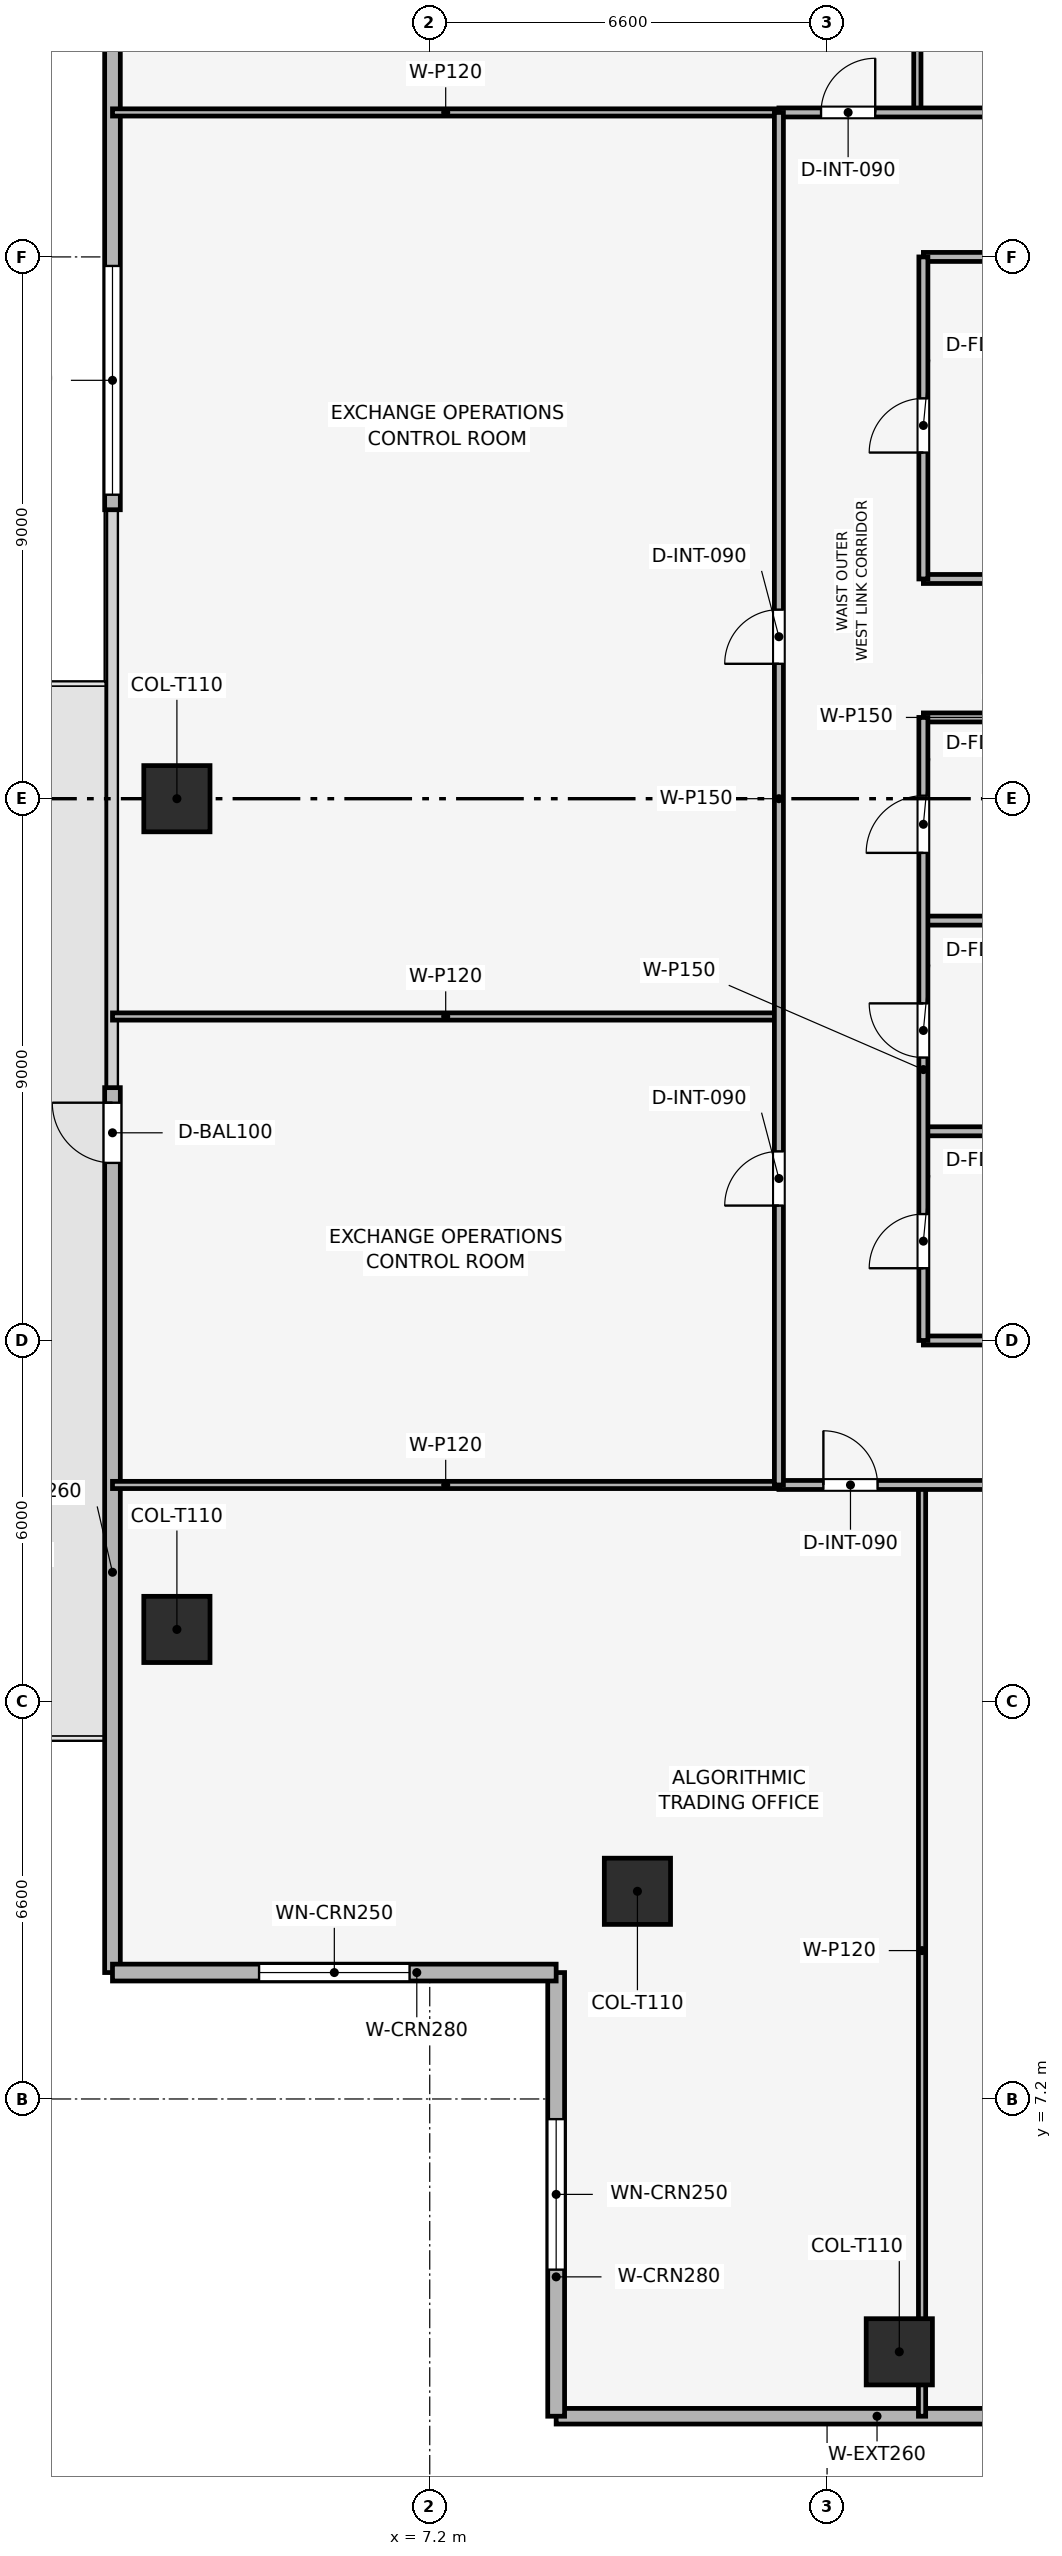
"""IFC4 building model, lengths in metres.
Left out: names, types, materials, properties, quantities, classifications, styles, units other than length and angle.
Written with IfcOpenShell. Run it as: python <this file> out.ifc"""

import sys

from ifc_helpers import new_model, si_unit, direction, frame, frame_2d, origin, origin_2d, place, context, subcontext, project, spatial, rectangle, extrude, element, fill, save


model = new_model("IFC4")
c1 = context("Model", 3, precision=1e-05, world=origin(), true_north=direction((0.0, 1.0)))
c2 = subcontext(c1, "Body", "Model", "MODEL_VIEW")
j1 = project(units=[si_unit("LENGTHUNIT", "METRE"), si_unit("PLANEANGLEUNIT", "RADIAN")], contexts=[c1])
p1 = place(None, origin())
s1 = spatial("IfcSite", under=j1, at=p1, CompositionType="ELEMENT")
p2 = place(p1, origin())
s2 = spatial("IfcBuilding", under=s1, at=p2, CompositionType="ELEMENT")
p3 = place(p2, frame((0.0, 0.0, 203.7)))
s3 = spatial("IfcBuildingStorey", under=s2, at=p3, CompositionType="ELEMENT", Elevation=203.7)
for number, where, z_axis, x_axis in (
    (1, (15.0, 3.0, 0.003), (0.0, 0.0, 1.0), (1.0, 0.0, 0.0)),
    (2, (3.0, 28.8, 0.003), (0.0, 0.0, 1.0), (1.0, 0.0, 0.0)),
    (3, (3.0, 15.0, 0.003), (0.0, 0.0, 1.0), (1.0, 0.0, 0.0)),
    (4, (10.65, 10.65, 0.003), (0.0, 0.0, 1.0), (1.0, 0.0, 0.0)),
):
    element("IfcColumn", number, at=place(p3, frame(where, z_axis=z_axis, x_axis=x_axis)), inside=s3, PredefinedType="COLUMN", context=c2, shape_type="SweptSolid", body=[
        extrude(rectangle(XDim=1.1, YDim=1.1, at=origin_2d()), origin(), (0.0, 0.0, 1.0), 3.494),
    ])
p4 = place(p3, frame((24.0, 1.93, 0.0), z_axis=(0.0, 0.0, 1.0), x_axis=(-1.0, 0.0, 0.0)))
e5 = element("IfcWall", 5, at=p4, inside=s3, PredefinedType="SOLIDWALL", context=c2, shape_type="SweptSolid", body=[
    extrude(rectangle(XDim=14.7, YDim=0.26, at=frame_2d((7.35, 0.0))), origin(), (0.0, 0.0, 1.0), 3.5),
])
p5 = place(p4, frame((2.33, 0.0, 0.9)))
e6 = element("IfcOpeningElement", 6, at=p5, cuts=e5, PredefinedType="OPENING", context=c2, shape_type="SweptSolid", body=[
    extrude(rectangle(XDim=3.8, YDim=1.9, at=frame_2d((1.9, 0.95))), frame((0.0, 0.14, 0.0), z_axis=(0.0, -1.0, 0.0), x_axis=(1.0, 0.0, 0.0)), (0.0, 0.0, 1.0), 0.28),
])
p6 = place(p3, frame((1.93, 9.3, 0.0), z_axis=(0.0, 0.0, 1.0), x_axis=(0.0, 1.0, 0.0)))
e7 = element("IfcWall", 7, at=p6, inside=s3, PredefinedType="SOLIDWALL", context=c2, shape_type="SweptSolid", body=[
    extrude(rectangle(XDim=14.7, YDim=0.26, at=frame_2d((7.35, 0.0))), origin(), (0.0, 0.0, 1.0), 3.5),
])
p7 = place(p6, frame((13.45, 0.0, 0.0)))
e8 = element("IfcOpeningElement", 8, at=p7, cuts=e7, PredefinedType="OPENING", context=c2, shape_type="SweptSolid", body=[
    extrude(rectangle(XDim=1.0, YDim=2.2, at=frame_2d((0.5, 1.1))), frame((0.0, 0.14, 0.0), z_axis=(0.0, -1.0, 0.0), x_axis=(1.0, 0.0, 0.0)), (0.0, 0.0, 1.0), 0.28),
])
p8 = place(p3, frame((1.93, 33.6, 0.0), z_axis=(0.0, 0.0, 1.0), x_axis=(0.0, 1.0, 0.0)))
e9 = element("IfcWall", 9, at=p8, inside=s3, PredefinedType="SOLIDWALL", context=c2, shape_type="SweptSolid", body=[
    extrude(rectangle(XDim=14.7, YDim=0.26, at=frame_2d((7.35, 0.0))), origin(), (0.0, 0.0, 1.0), 3.5),
])
p9 = place(p8, frame((0.25, 0.0, 0.9)))
e10 = element("IfcOpeningElement", 10, at=p9, cuts=e9, PredefinedType="OPENING", context=c2, shape_type="SweptSolid", body=[
    extrude(rectangle(XDim=3.8, YDim=1.9, at=frame_2d((1.9, 0.95))), frame((0.0, 0.14, 0.0), z_axis=(0.0, -1.0, 0.0), x_axis=(1.0, 0.0, 0.0)), (0.0, 0.0, 1.0), 0.28),
])
p10 = place(p3, frame((9.3, 1.93, 0.0), z_axis=(0.0, 0.0, 1.0), x_axis=(0.0, 1.0, 0.0)))
e11 = element("IfcWall", 11, at=p10, inside=s3, PredefinedType="SOLIDWALL", context=c2, shape_type="SweptSolid", body=[
    extrude(rectangle(XDim=7.37, YDim=0.28, at=frame_2d((3.685, 0.0))), origin(), (0.0, 0.0, 1.0), 3.5),
])
p11 = place(p10, frame((2.435, 0.0, 0.9)))
e12 = element("IfcOpeningElement", 12, at=p11, cuts=e11, PredefinedType="OPENING", context=c2, shape_type="SweptSolid", body=[
    extrude(rectangle(XDim=2.5, YDim=1.9, at=frame_2d((1.25, 0.95))), frame((0.0, 0.15, 0.0), z_axis=(0.0, -1.0, 0.0), x_axis=(1.0, 0.0, 0.0)), (0.0, 0.0, 1.0), 0.3),
])
p12 = place(p3, frame((9.3, 9.3, 0.0), z_axis=(0.0, 0.0, 1.0), x_axis=(-1.0, 0.0, 0.0)))
e13 = element("IfcWall", 13, at=p12, inside=s3, PredefinedType="SOLIDWALL", context=c2, shape_type="SweptSolid", body=[
    extrude(rectangle(XDim=7.37, YDim=0.28, at=frame_2d((3.685, 0.0))), origin(), (0.0, 0.0, 1.0), 3.5),
])
p13 = place(p12, frame((2.435, 0.0, 0.9)))
e14 = element("IfcOpeningElement", 14, at=p13, cuts=e13, PredefinedType="OPENING", context=c2, shape_type="SweptSolid", body=[
    extrude(rectangle(XDim=2.5, YDim=1.9, at=frame_2d((1.25, 0.95))), frame((0.0, 0.15, 0.0), z_axis=(0.0, -1.0, 0.0), x_axis=(1.0, 0.0, 0.0)), (0.0, 0.0, 1.0), 0.3),
])
p14 = place(p3, frame((15.4, 19.8, 0.0), z_axis=(0.0, 0.0, 1.0), x_axis=(1.0, 0.0, 0.0)))
e15 = element("IfcWall", 15, at=p14, inside=s3, PredefinedType="PARTITIONING", context=c2, shape_type="SweptSolid", body=[
    extrude(rectangle(XDim=4.4, YDim=0.15, at=frame_2d((2.2, 0.0))), origin(), (0.0, 0.0, 1.0), 3.035),
])
for number, where, z_axis, x_axis in (
    (16, (15.4, 23.275, 0.0), (0.0, 0.0, 1.0), (1.0, 0.0, 0.0)),
    (17, (15.4, 26.775, 0.0), (0.0, 0.0, 1.0), (1.0, 0.0, 0.0)),
    (18, (15.4, 30.15, 0.0), (0.0, 0.0, 1.0), (1.0, 0.0, 0.0)),
    (19, (15.4, 32.45, 0.0), (0.0, 0.0, 1.0), (1.0, 0.0, 0.0)),
):
    element("IfcWall", number, at=place(p3, frame(where, z_axis=z_axis, x_axis=x_axis)), inside=s3, PredefinedType="PARTITIONING", context=c2, shape_type="SweptSolid", body=[
        extrude(rectangle(XDim=4.4, YDim=0.15, at=frame_2d((2.2, 0.0))), origin(), (0.0, 0.0, 1.0), 3.5),
    ])
p15 = place(p3, frame((15.4, 37.8, 0.0), z_axis=(0.0, 0.0, 1.0), x_axis=(1.0, 0.0, 0.0)))
e20 = element("IfcWall", 20, at=p15, inside=s3, PredefinedType="PARTITIONING", context=c2, shape_type="SweptSolid", body=[
    extrude(rectangle(XDim=4.4, YDim=0.15, at=frame_2d((2.2, 0.0))), origin(), (0.0, 0.0, 1.0), 3.035),
])
p16 = place(p3, frame((15.4, 19.8, 0.0), z_axis=(0.0, 0.0, 1.0), x_axis=(0.0, 1.0, 0.0)))
e21 = element("IfcWall", 21, at=p16, inside=s3, PredefinedType="PARTITIONING", context=c2, shape_type="SweptSolid", body=[
    extrude(rectangle(XDim=10.35, YDim=0.15, at=frame_2d((5.175, 0.0))), origin(), (0.0, 0.0, 1.0), 3.035),
])
p17 = place(p16, frame((1.2, 0.0, 0.0)))
e22 = element("IfcOpeningElement", 22, at=p17, cuts=e21, PredefinedType="OPENING", context=c2, shape_type="SweptSolid", body=[
    extrude(rectangle(XDim=0.9, YDim=2.1, at=frame_2d((0.45, 1.05))), frame((0.0, 0.085, 0.0), z_axis=(0.0, -1.0, 0.0), x_axis=(1.0, 0.0, 0.0)), (0.0, 0.0, 1.0), 0.17),
])
p18 = place(p16, frame((4.7, 0.0, 0.0)))
e23 = element("IfcOpeningElement", 23, at=p18, cuts=e21, PredefinedType="OPENING", context=c2, shape_type="SweptSolid", body=[
    extrude(rectangle(XDim=0.9, YDim=2.1, at=frame_2d((0.45, 1.05))), frame((0.0, 0.085, 0.0), z_axis=(0.0, -1.0, 0.0), x_axis=(1.0, 0.0, 0.0)), (0.0, 0.0, 1.0), 0.17),
])
p19 = place(p16, frame((8.1, 0.0, 0.0)))
e24 = element("IfcOpeningElement", 24, at=p19, cuts=e21, PredefinedType="OPENING", context=c2, shape_type="SweptSolid", body=[
    extrude(rectangle(XDim=0.95, YDim=2.1, at=frame_2d((0.475, 1.05))), frame((0.0, 0.085, 0.0), z_axis=(0.0, -1.0, 0.0), x_axis=(1.0, 0.0, 0.0)), (0.0, 0.0, 1.0), 0.17),
])
p20 = place(p3, frame((15.4, 32.45, 0.0), z_axis=(0.0, 0.0, 1.0), x_axis=(0.0, 1.0, 0.0)))
e25 = element("IfcWall", 25, at=p20, inside=s3, PredefinedType="PARTITIONING", context=c2, shape_type="SweptSolid", body=[
    extrude(rectangle(XDim=5.35, YDim=0.15, at=frame_2d((2.675, 0.0))), origin(), (0.0, 0.0, 1.0), 3.035),
])
p21 = place(p20, frame((2.1, 0.0, 0.0)))
e26 = element("IfcOpeningElement", 26, at=p21, cuts=e25, PredefinedType="OPENING", context=c2, shape_type="SweptSolid", body=[
    extrude(rectangle(XDim=0.9, YDim=2.1, at=frame_2d((0.45, 1.05))), frame((0.0, 0.085, 0.0), z_axis=(0.0, -1.0, 0.0), x_axis=(1.0, 0.0, 0.0)), (0.0, 0.0, 1.0), 0.17),
])
for number, where, z_axis, x_axis in (
    (27, (15.378, 1.93, 0.0), (0.0, 0.0, 1.0), (0.0, 1.0, 0.0)),
    (28, (15.3, 40.2, 0.0), (0.0, 0.0, 1.0), (0.0, 1.0, 0.0)),
):
    element("IfcWall", number, at=place(p3, frame(where, z_axis=z_axis, x_axis=x_axis)), inside=s3, PredefinedType="PARTITIONING", context=c2, shape_type="SweptSolid", body=[
        extrude(rectangle(XDim=15.47, YDim=0.12, at=frame_2d((7.735, 0.0))), origin(), (0.0, 0.0, 1.0), 2.885),
    ])
for number, where, z_axis, x_axis in (
    (29, (1.93, 25.182, 0.0), (0.0, 0.0, 1.0), (1.0, 0.0, 0.0)),
    (30, (1.93, 17.4, 0.0), (0.0, 0.0, 1.0), (1.0, 0.0, 0.0)),
    (31, (1.93, 40.2, 0.0), (0.0, 0.0, 1.0), (1.0, 0.0, 0.0)),
):
    element("IfcWall", number, at=place(p3, frame(where, z_axis=z_axis, x_axis=x_axis)), inside=s3, PredefinedType="PARTITIONING", context=c2, shape_type="SweptSolid", body=[
        extrude(rectangle(XDim=11.07, YDim=0.12, at=frame_2d((5.535, 0.0))), origin(), (0.0, 0.0, 1.0), 2.885),
    ])
p22 = place(p3, frame((13.0, 17.4, 0.0), z_axis=(0.0, 0.0, 1.0), x_axis=(1.0, 0.0, 0.0)))
e32 = element("IfcWall", 32, at=p22, inside=s3, PredefinedType="PARTITIONING", context=c2, shape_type="SweptSolid", body=[
    extrude(rectangle(XDim=31.6, YDim=0.15, at=frame_2d((15.8, 0.0))), origin(), (0.0, 0.0, 1.0), 3.035),
])
p23 = place(p22, frame((0.739, 0.0, 0.0)))
e33 = element("IfcOpeningElement", 33, at=p23, cuts=e32, PredefinedType="OPENING", context=c2, shape_type="SweptSolid", body=[
    extrude(rectangle(XDim=0.9, YDim=2.1, at=frame_2d((0.45, 1.05))), frame((0.0, 0.085, 0.0), z_axis=(0.0, -1.0, 0.0), x_axis=(1.0, 0.0, 0.0)), (0.0, 0.0, 1.0), 0.17),
])
p24 = place(p22, frame((6.344, 0.0, 0.0)))
e34 = element("IfcOpeningElement", 34, at=p24, cuts=e32, PredefinedType="OPENING", context=c2, shape_type="SweptSolid", body=[
    extrude(rectangle(XDim=0.9, YDim=2.1, at=frame_2d((0.45, 1.05))), frame((0.0, 0.085, 0.0), z_axis=(0.0, -1.0, 0.0), x_axis=(1.0, 0.0, 0.0)), (0.0, 0.0, 1.0), 0.17),
])
p25 = place(p22, frame((15.174, 0.0, 0.0)))
e35 = element("IfcOpeningElement", 35, at=p25, cuts=e32, PredefinedType="OPENING", context=c2, shape_type="SweptSolid", body=[
    extrude(rectangle(XDim=0.9, YDim=2.1, at=frame_2d((0.45, 1.05))), frame((0.0, 0.085, 0.0), z_axis=(0.0, -1.0, 0.0), x_axis=(1.0, 0.0, 0.0)), (0.0, 0.0, 1.0), 0.17),
])
p26 = place(p22, frame((25.37, 0.0, 0.0)))
e36 = element("IfcOpeningElement", 36, at=p26, cuts=e32, PredefinedType="OPENING", context=c2, shape_type="SweptSolid", body=[
    extrude(rectangle(XDim=0.9, YDim=2.1, at=frame_2d((0.45, 1.05))), frame((0.0, 0.085, 0.0), z_axis=(0.0, -1.0, 0.0), x_axis=(1.0, 0.0, 0.0)), (0.0, 0.0, 1.0), 0.17),
])
p27 = place(p3, frame((13.0, 40.2, 0.0), z_axis=(0.0, 0.0, 1.0), x_axis=(1.0, 0.0, 0.0)))
e37 = element("IfcWall", 37, at=p27, inside=s3, PredefinedType="PARTITIONING", context=c2, shape_type="SweptSolid", body=[
    extrude(rectangle(XDim=31.6, YDim=0.15, at=frame_2d((15.8, 0.0))), origin(), (0.0, 0.0, 1.0), 3.035),
])
p28 = place(p27, frame((0.7, 0.0, 0.0)))
e38 = element("IfcOpeningElement", 38, at=p28, cuts=e37, PredefinedType="OPENING", context=c2, shape_type="SweptSolid", body=[
    extrude(rectangle(XDim=0.9, YDim=2.1, at=frame_2d((0.45, 1.05))), frame((0.0, 0.085, 0.0), z_axis=(0.0, -1.0, 0.0), x_axis=(1.0, 0.0, 0.0)), (0.0, 0.0, 1.0), 0.17),
])
p29 = place(p27, frame((6.454, 0.0, 0.0)))
e39 = element("IfcOpeningElement", 39, at=p29, cuts=e37, PredefinedType="OPENING", context=c2, shape_type="SweptSolid", body=[
    extrude(rectangle(XDim=0.9, YDim=2.1, at=frame_2d((0.45, 1.05))), frame((0.0, 0.085, 0.0), z_axis=(0.0, -1.0, 0.0), x_axis=(1.0, 0.0, 0.0)), (0.0, 0.0, 1.0), 0.17),
])
p30 = place(p27, frame((15.473, 0.0, 0.0)))
e40 = element("IfcOpeningElement", 40, at=p30, cuts=e37, PredefinedType="OPENING", context=c2, shape_type="SweptSolid", body=[
    extrude(rectangle(XDim=0.9, YDim=2.1, at=frame_2d((0.45, 1.05))), frame((0.0, 0.085, 0.0), z_axis=(0.0, -1.0, 0.0), x_axis=(1.0, 0.0, 0.0)), (0.0, 0.0, 1.0), 0.17),
])
p31 = place(p27, frame((25.519, 0.0, 0.0)))
e41 = element("IfcOpeningElement", 41, at=p31, cuts=e37, PredefinedType="OPENING", context=c2, shape_type="SweptSolid", body=[
    extrude(rectangle(XDim=0.9, YDim=2.1, at=frame_2d((0.45, 1.05))), frame((0.0, 0.085, 0.0), z_axis=(0.0, -1.0, 0.0), x_axis=(1.0, 0.0, 0.0)), (0.0, 0.0, 1.0), 0.17),
])
p32 = place(p3, frame((13.0, 17.4, 0.0), z_axis=(0.0, 0.0, 1.0), x_axis=(0.0, 1.0, 0.0)))
e42 = element("IfcWall", 42, at=p32, inside=s3, PredefinedType="PARTITIONING", context=c2, shape_type="SweptSolid", body=[
    extrude(rectangle(XDim=22.8, YDim=0.15, at=frame_2d((11.4, 0.0))), origin(), (0.0, 0.0, 1.0), 3.035),
])
p33 = place(p32, frame((4.641, 0.0, 0.0)))
e43 = element("IfcOpeningElement", 43, at=p33, cuts=e42, PredefinedType="OPENING", context=c2, shape_type="SweptSolid", body=[
    extrude(rectangle(XDim=0.9, YDim=2.1, at=frame_2d((0.45, 1.05))), frame((0.0, 0.085, 0.0), z_axis=(0.0, -1.0, 0.0), x_axis=(1.0, 0.0, 0.0)), (0.0, 0.0, 1.0), 0.17),
])
p34 = place(p32, frame((13.641, 0.0, 0.0)))
e44 = element("IfcOpeningElement", 44, at=p34, cuts=e42, PredefinedType="OPENING", context=c2, shape_type="SweptSolid", body=[
    extrude(rectangle(XDim=0.9, YDim=2.1, at=frame_2d((0.45, 1.05))), frame((0.0, 0.085, 0.0), z_axis=(0.0, -1.0, 0.0), x_axis=(1.0, 0.0, 0.0)), (0.0, 0.0, 1.0), 0.17),
])
p35 = place(p7, origin())
e45 = element("IfcDoor", 45, at=p35, inside=s3, OperationType="SINGLE_SWING_RIGHT", PredefinedType="DOOR", context=c2, shape_type="SweptSolid", body=[
    extrude(rectangle(XDim=1.0, YDim=2.2, at=frame_2d((0.5, 1.1))), frame((0.0, 0.025, 0.0), z_axis=(0.0, -1.0, 0.0), x_axis=(1.0, 0.0, 0.0)), (0.0, 0.0, 1.0), 0.05),
])
fill(e8, e45)
p36 = place(p9, origin())
e46 = element("IfcWindow", 46, at=p36, inside=s3, PartitioningType="SINGLE_PANEL", PredefinedType="WINDOW", context=c2, shape_type="SweptSolid", body=[
    extrude(rectangle(XDim=3.8, YDim=1.9, at=frame_2d((1.9, 0.95))), frame((0.0, 0.03, 0.0), z_axis=(0.0, -1.0, 0.0), x_axis=(1.0, 0.0, 0.0)), (0.0, 0.0, 1.0), 0.06),
])
fill(e10, e46)
p37 = place(p11, origin())
e47 = element("IfcWindow", 47, at=p37, inside=s3, PartitioningType="SINGLE_PANEL", PredefinedType="WINDOW", context=c2, shape_type="SweptSolid", body=[
    extrude(rectangle(XDim=2.5, YDim=1.9, at=frame_2d((1.25, 0.95))), frame((0.0, 0.03, 0.0), z_axis=(0.0, -1.0, 0.0), x_axis=(1.0, 0.0, 0.0)), (0.0, 0.0, 1.0), 0.06),
])
fill(e12, e47)
p38 = place(p13, origin())
e48 = element("IfcWindow", 48, at=p38, inside=s3, PartitioningType="SINGLE_PANEL", PredefinedType="WINDOW", context=c2, shape_type="SweptSolid", body=[
    extrude(rectangle(XDim=2.5, YDim=1.9, at=frame_2d((1.25, 0.95))), frame((0.0, 0.03, 0.0), z_axis=(0.0, -1.0, 0.0), x_axis=(1.0, 0.0, 0.0)), (0.0, 0.0, 1.0), 0.06),
])
fill(e14, e48)
p39 = place(p17, origin())
e49 = element("IfcDoor", 49, at=p39, inside=s3, OperationType="SINGLE_SWING_LEFT", PredefinedType="DOOR", context=c2, shape_type="SweptSolid", body=[
    extrude(rectangle(XDim=0.9, YDim=2.1, at=frame_2d((0.45, 1.05))), frame((0.0, 0.025, 0.0), z_axis=(0.0, -1.0, 0.0), x_axis=(1.0, 0.0, 0.0)), (0.0, 0.0, 1.0), 0.05),
])
fill(e22, e49)
p40 = place(p18, origin())
e50 = element("IfcDoor", 50, at=p40, inside=s3, OperationType="SINGLE_SWING_RIGHT", PredefinedType="DOOR", context=c2, shape_type="SweptSolid", body=[
    extrude(rectangle(XDim=0.9, YDim=2.1, at=frame_2d((0.45, 1.05))), frame((0.0, 0.025, 0.0), z_axis=(0.0, -1.0, 0.0), x_axis=(1.0, 0.0, 0.0)), (0.0, 0.0, 1.0), 0.05),
])
fill(e23, e50)
p41 = place(p19, origin())
e51 = element("IfcDoor", 51, at=p41, inside=s3, OperationType="SINGLE_SWING_LEFT", PredefinedType="DOOR", context=c2, shape_type="SweptSolid", body=[
    extrude(rectangle(XDim=0.95, YDim=2.1, at=frame_2d((0.475, 1.05))), frame((0.0, 0.025, 0.0), z_axis=(0.0, -1.0, 0.0), x_axis=(1.0, 0.0, 0.0)), (0.0, 0.0, 1.0), 0.05),
])
fill(e24, e51)
p42 = place(p21, origin())
e52 = element("IfcDoor", 52, at=p42, inside=s3, OperationType="SINGLE_SWING_LEFT", PredefinedType="DOOR", context=c2, shape_type="SweptSolid", body=[
    extrude(rectangle(XDim=0.9, YDim=2.1, at=frame_2d((0.45, 1.05))), frame((0.0, 0.025, 0.0), z_axis=(0.0, -1.0, 0.0), x_axis=(1.0, 0.0, 0.0)), (0.0, 0.0, 1.0), 0.05),
])
fill(e26, e52)
p43 = place(p23, origin())
e53 = element("IfcDoor", 53, at=p43, inside=s3, OperationType="SINGLE_SWING_LEFT", PredefinedType="DOOR", context=c2, shape_type="SweptSolid", body=[
    extrude(rectangle(XDim=0.9, YDim=2.1, at=frame_2d((0.45, 1.05))), frame((0.0, 0.025, 0.0), z_axis=(0.0, -1.0, 0.0), x_axis=(1.0, 0.0, 0.0)), (0.0, 0.0, 1.0), 0.05),
])
fill(e33, e53)
p44 = place(p28, origin())
e54 = element("IfcDoor", 54, at=p44, inside=s3, OperationType="SINGLE_SWING_RIGHT", PredefinedType="DOOR", context=c2, shape_type="SweptSolid", body=[
    extrude(rectangle(XDim=0.9, YDim=2.1, at=frame_2d((0.45, 1.05))), frame((0.0, 0.025, 0.0), z_axis=(0.0, -1.0, 0.0), x_axis=(1.0, 0.0, 0.0)), (0.0, 0.0, 1.0), 0.05),
])
fill(e38, e54)
p45 = place(p33, origin())
e55 = element("IfcDoor", 55, at=p45, inside=s3, OperationType="SINGLE_SWING_LEFT", PredefinedType="DOOR", context=c2, shape_type="SweptSolid", body=[
    extrude(rectangle(XDim=0.9, YDim=2.1, at=frame_2d((0.45, 1.05))), frame((0.0, 0.025, 0.0), z_axis=(0.0, -1.0, 0.0), x_axis=(1.0, 0.0, 0.0)), (0.0, 0.0, 1.0), 0.05),
])
fill(e43, e55)
p46 = place(p34, origin())
e56 = element("IfcDoor", 56, at=p46, inside=s3, OperationType="SINGLE_SWING_LEFT", PredefinedType="DOOR", context=c2, shape_type="SweptSolid", body=[
    extrude(rectangle(XDim=0.9, YDim=2.1, at=frame_2d((0.45, 1.05))), frame((0.0, 0.025, 0.0), z_axis=(0.0, -1.0, 0.0), x_axis=(1.0, 0.0, 0.0)), (0.0, 0.0, 1.0), 0.05),
])
fill(e44, e56)
save(model, sys.argv[1])
